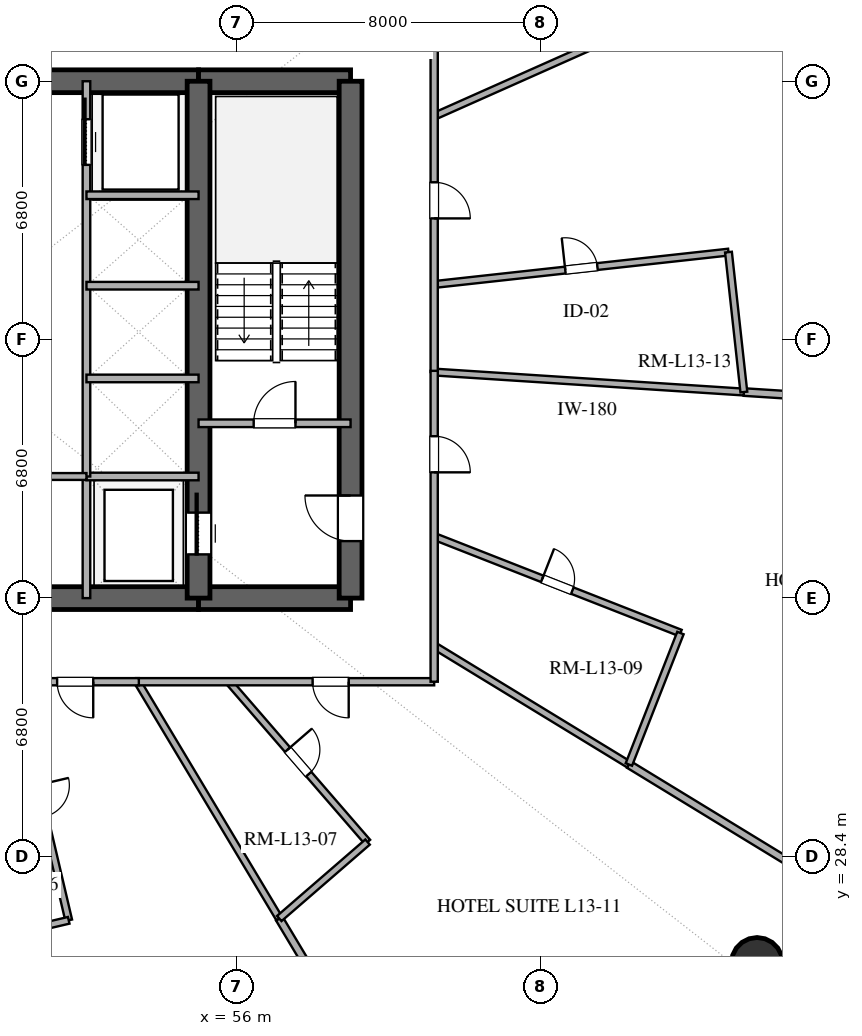
"""IFC4 building model, lengths in metres.
Left out: names, types, materials, properties, quantities, classifications, styles, units other than length and angle.
Written with IfcOpenShell. Run it as: python <this file> out.ifc"""

import sys

from ifc_helpers import new_model, si_unit, direction, frame, frame_2d, origin, origin_2d, place, context, subcontext, project, spatial, rectangle, hollow_circle, extrude, element, fill, save


model = new_model("IFC4")
c1 = context("Model", 3, precision=1e-05, world=origin(), true_north=direction((0.0, 1.0)))
c2 = subcontext(c1, "Body", "Model", "MODEL_VIEW")
j1 = project(units=[si_unit("LENGTHUNIT", "METRE"), si_unit("PLANEANGLEUNIT", "RADIAN")], contexts=[c1])
p1 = place(None, origin())
s1 = spatial("IfcSite", under=j1, at=p1, CompositionType="ELEMENT")
p2 = place(p1, origin())
s2 = spatial("IfcBuilding", under=s1, at=p2, CompositionType="ELEMENT")
p3 = place(p2, frame((0.0, 0.0, 57.0)))
s3 = spatial("IfcBuildingStorey", under=s2, at=p3, CompositionType="ELEMENT", Elevation=57.0)
p4 = place(p3, frame((41.0, 35.2, 0.0), z_axis=(0.0, 0.0, 1.0), x_axis=(1.0, 0.0, 0.0)))
e1 = element("IfcWall", 1, at=p4, inside=s3, PredefinedType="SHEAR", context=c2, shape_type="SweptSolid", body=[
    extrude(rectangle(XDim=14.0, YDim=0.6, at=frame_2d((7.0, 0.0))), origin(), (0.0, 0.0, 1.0), 3.38),
])
p5 = place(p4, frame((6.1, 0.0, 0.0)))
e2 = element("IfcOpeningElement", 2, at=p5, cuts=e1, PredefinedType="OPENING", context=c2, shape_type="SweptSolid", body=[
    extrude(rectangle(XDim=1.8, YDim=2.25, at=frame_2d((0.9, 1.125))), frame((0.0, 0.31, 0.0), z_axis=(0.0, -1.0, 0.0), x_axis=(1.0, 0.0, 0.0)), (0.0, 0.0, 1.0), 0.62),
])
p6 = place(p3, frame((55.0, 35.2, 0.0), z_axis=(0.0, 0.0, 1.0), x_axis=(1.0, 0.0, 0.0)))
e3 = element("IfcWall", 3, at=p6, inside=s3, PredefinedType="SHEAR", context=c2, shape_type="SweptSolid", body=[
    extrude(rectangle(XDim=4.0, YDim=0.6, at=frame_2d((2.0, 0.0))), origin(), (0.0, 0.0, 1.0), 3.38),
])
p7 = place(p3, frame((41.0, 48.8, 0.0), z_axis=(0.0, 0.0, 1.0), x_axis=(1.0, 0.0, 0.0)))
e4 = element("IfcWall", 4, at=p7, inside=s3, PredefinedType="SHEAR", context=c2, shape_type="SweptSolid", body=[
    extrude(rectangle(XDim=14.0, YDim=0.6, at=frame_2d((7.0, 0.0))), origin(), (0.0, 0.0, 1.0), 3.38),
])
p8 = place(p7, frame((6.1, 0.0, 0.0)))
e5 = element("IfcOpeningElement", 5, at=p8, cuts=e4, PredefinedType="OPENING", context=c2, shape_type="SweptSolid", body=[
    extrude(rectangle(XDim=1.8, YDim=2.25, at=frame_2d((0.9, 1.125))), frame((0.0, 0.31, 0.0), z_axis=(0.0, -1.0, 0.0), x_axis=(1.0, 0.0, 0.0)), (0.0, 0.0, 1.0), 0.62),
])
p9 = place(p3, frame((55.0, 48.8, 0.0), z_axis=(0.0, 0.0, 1.0), x_axis=(1.0, 0.0, 0.0)))
e6 = element("IfcWall", 6, at=p9, inside=s3, PredefinedType="SHEAR", context=c2, shape_type="SweptSolid", body=[
    extrude(rectangle(XDim=4.0, YDim=0.6, at=frame_2d((2.0, 0.0))), origin(), (0.0, 0.0, 1.0), 3.38),
])
p10 = place(p3, frame((59.0, 35.2, 0.0), z_axis=(0.0, 0.0, 1.0), x_axis=(0.0, 1.0, 0.0)))
e7 = element("IfcWall", 7, at=p10, inside=s3, PredefinedType="SHEAR", context=c2, shape_type="SweptSolid", body=[
    extrude(rectangle(XDim=13.6, YDim=0.6, at=frame_2d((6.8, 0.0))), origin(), (0.0, 0.0, 1.0), 3.38),
])
p11 = place(p10, frame((1.5, 0.0, 0.0)))
e8 = element("IfcOpeningElement", 8, at=p11, cuts=e7, PredefinedType="OPENING", context=c2, shape_type="SweptSolid", body=[
    extrude(rectangle(XDim=1.2, YDim=2.15, at=frame_2d((0.6, 1.075))), frame((0.0, 0.31, 0.0), z_axis=(0.0, -1.0, 0.0), x_axis=(1.0, 0.0, 0.0)), (0.0, 0.0, 1.0), 0.62),
])
p12 = place(p3, frame((55.0, 35.2, 0.0), z_axis=(0.0, 0.0, 1.0), x_axis=(0.0, 1.0, 0.0)))
e9 = element("IfcWall", 9, at=p12, inside=s3, PredefinedType="SHEAR", context=c2, shape_type="SweptSolid", body=[
    extrude(rectangle(XDim=13.6, YDim=0.6, at=frame_2d((6.8, 0.0))), origin(), (0.0, 0.0, 1.0), 3.38),
])
p13 = place(p12, frame((1.15, 0.0, 0.0)))
e10 = element("IfcOpeningElement", 10, at=p13, cuts=e9, PredefinedType="OPENING", context=c2, shape_type="SweptSolid", body=[
    extrude(rectangle(XDim=1.1, YDim=2.2, at=frame_2d((0.55, 1.1))), frame((0.0, 0.31, 0.0), z_axis=(0.0, -1.0, 0.0), x_axis=(1.0, 0.0, 0.0)), (0.0, 0.0, 1.0), 0.62),
])
p14 = place(p3, frame((69.697, 25.595, 0.0), z_axis=(0.0, 0.0, 1.0), x_axis=(1.0, 0.0, 0.0)))
e11 = element("IfcColumn", 11, at=p14, inside=s3, PredefinedType="COLUMN", context=c2, shape_type="SweptSolid", body=[
    extrude(hollow_circle(Radius=0.675, WallThickness=0.036, at=origin_2d()), origin(), (0.0, 0.0, 1.0), 3.38),
])
p15 = place(p3, frame((70.174, 25.114, 0.0), z_axis=(0.0, 0.0, 1.0), x_axis=(0.637296809613, 0.770618437657, 0.0)))
e12 = element("IfcWall", 12, at=p15, inside=s3, PredefinedType="SOLIDWALL", context=c2, shape_type="SweptSolid", body=[
    extrude(rectangle(XDim=10.053, YDim=0.28, at=frame_2d((5.027, 0.0))), origin(), (0.0, 0.0, 1.0), 3.38),
])
p16 = place(p15, frame((1.565, 0.0, 0.85)))
e13 = element("IfcOpeningElement", 13, at=p16, cuts=e12, PredefinedType="OPENING", context=c2, shape_type="SweptSolid", body=[
    extrude(rectangle(XDim=1.0, YDim=1.8, at=frame_2d((0.5, 0.9))), frame((0.0, 0.15, 0.0), z_axis=(0.0, -1.0, 0.0), x_axis=(1.0, 0.0, 0.0)), (0.0, 0.0, 1.0), 0.3),
])
p17 = place(p15, frame((4.03, 0.0, 0.85)))
e14 = element("IfcOpeningElement", 14, at=p17, cuts=e12, PredefinedType="OPENING", context=c2, shape_type="SweptSolid", body=[
    extrude(rectangle(XDim=1.35, YDim=1.8, at=frame_2d((0.675, 0.9))), frame((0.0, 0.15, 0.0), z_axis=(0.0, -1.0, 0.0), x_axis=(1.0, 0.0, 0.0)), (0.0, 0.0, 1.0), 0.3),
])
p18 = place(p15, frame((6.246, 0.0, 0.85)))
e15 = element("IfcOpeningElement", 15, at=p18, cuts=e12, PredefinedType="OPENING", context=c2, shape_type="SweptSolid", body=[
    extrude(rectangle(XDim=1.35, YDim=1.8, at=frame_2d((0.675, 0.9))), frame((0.0, 0.15, 0.0), z_axis=(0.0, -1.0, 0.0), x_axis=(1.0, 0.0, 0.0)), (0.0, 0.0, 1.0), 0.3),
])
p19 = place(p3, frame((55.0, 39.8, 0.0), z_axis=(0.0, 0.0, 1.0), x_axis=(1.0, 0.0, 0.0)))
e16 = element("IfcWall", 16, at=p19, inside=s3, PredefinedType="SOLIDWALL", context=c2, shape_type="SweptSolid", body=[
    extrude(rectangle(XDim=4.0, YDim=0.2, at=frame_2d((2.0, 0.0))), origin(), (0.0, 0.0, 1.0), 2.74),
])
p20 = place(p19, frame((1.45, 0.0, 0.0)))
e17 = element("IfcOpeningElement", 17, at=p20, cuts=e16, PredefinedType="OPENING", context=c2, shape_type="SweptSolid", body=[
    extrude(rectangle(XDim=1.1, YDim=2.15, at=frame_2d((0.55, 1.075))), frame((0.0, 0.11, 0.0), z_axis=(0.0, -1.0, 0.0), x_axis=(1.0, 0.0, 0.0)), (0.0, 0.0, 1.0), 0.22),
])
p21 = place(p3, frame((52.05, 35.2, 0.0), z_axis=(0.0, 0.0, 1.0), x_axis=(0.0, 1.0, 0.0)))
e18 = element("IfcWall", 18, at=p21, inside=s3, PredefinedType="SOLIDWALL", context=c2, shape_type="SweptSolid", body=[
    extrude(rectangle(XDim=3.2, YDim=0.2, at=frame_2d((1.6, 0.0))), origin(), (0.0, 0.0, 1.0), 2.74),
])
p22 = place(p3, frame((52.05, 38.4, 0.0), z_axis=(0.0, 0.0, 1.0), x_axis=(1.0, 0.0, 0.0)))
e19 = element("IfcWall", 19, at=p22, inside=s3, PredefinedType="SOLIDWALL", context=c2, shape_type="SweptSolid", body=[
    extrude(rectangle(XDim=2.95, YDim=0.2, at=frame_2d((1.475, 0.0))), origin(), (0.0, 0.0, 1.0), 2.74),
])
p23 = place(p3, frame((52.05, 38.4, 0.0), z_axis=(0.0, 0.0, 1.0), x_axis=(0.0, 1.0, 0.0)))
e20 = element("IfcWall", 20, at=p23, inside=s3, PredefinedType="SOLIDWALL", context=c2, shape_type="SweptSolid", body=[
    extrude(rectangle(XDim=10.4, YDim=0.2, at=frame_2d((5.2, 0.0))), origin(), (0.0, 0.0, 1.0), 2.74),
])
p24 = place(p23, frame((8.2, 0.0, 0.0)))
e21 = element("IfcOpeningElement", 21, at=p24, cuts=e20, PredefinedType="OPENING", context=c2, shape_type="SweptSolid", body=[
    extrude(rectangle(XDim=1.2, YDim=2.2, at=frame_2d((0.6, 1.1))), frame((0.0, 0.11, 0.0), z_axis=(0.0, -1.0, 0.0), x_axis=(1.0, 0.0, 0.0)), (0.0, 0.0, 1.0), 0.22),
])
for number, where, z_axis, x_axis in (
    (22, (52.05, 40.98, 0.0), (0.0, 0.0, 1.0), (1.0, 0.0, 0.0)),
    (23, (52.05, 43.42, 0.0), (0.0, 0.0, 1.0), (1.0, 0.0, 0.0)),
    (24, (52.05, 45.8, 0.0), (0.0, 0.0, 1.0), (1.0, 0.0, 0.0)),
):
    element("IfcWall", number, at=place(p3, frame(where, z_axis=z_axis, x_axis=x_axis)), inside=s3, PredefinedType="SOLIDWALL", context=c2, shape_type="SweptSolid", body=[
        extrude(rectangle(XDim=2.95, YDim=0.2, at=frame_2d((1.475, 0.0))), origin(), (0.0, 0.0, 1.0), 2.74),
    ])
p25 = place(p3, frame((49.2, 38.4, 0.0), z_axis=(0.0, 0.0, 1.0), x_axis=(1.0, 0.0, 0.0)))
e25 = element("IfcWall", 25, at=p25, inside=s3, PredefinedType="PLUMBINGWALL", context=c2, shape_type="SweptSolid", body=[
    extrude(rectangle(XDim=2.85, YDim=0.18, at=frame_2d((1.425, 0.0))), origin(), (0.0, 0.0, 1.0), 2.74),
])
p26 = place(p3, frame((78.364, 40.041, 0.0), z_axis=(0.0, 0.0, 1.0), x_axis=(-0.997924020497, 0.064402246198, 0.0)))
e26 = element("IfcWall", 26, at=p26, inside=s3, PredefinedType="PARTITIONING", context=c2, shape_type="SweptSolid", body=[
    extrude(rectangle(XDim=9.034, YDim=0.2, at=frame_2d((4.517, 0.0))), origin(), (0.0, 0.0, 1.0), 2.74),
])
p27 = place(p3, frame((69.349, 40.622, 0.0), z_axis=(0.0, 0.0, 1.0), x_axis=(-0.997924317455, 0.064397644621, 0.0)))
e27 = element("IfcWall", 27, at=p27, inside=s3, PredefinedType="PLUMBINGWALL", context=c2, shape_type="SweptSolid", body=[
    extrude(rectangle(XDim=8.166, YDim=0.18, at=frame_2d((4.083, 0.0))), origin(), (0.0, 0.0, 1.0), 2.74),
])
p28 = place(p3, frame((61.2, 43.452, 0.0), z_axis=(0.0, 0.0, 1.0), x_axis=(0.994005037085, 0.109334286708, 0.0)))
e28 = element("IfcWall", 28, at=p28, inside=s3, PredefinedType="PLUMBINGWALL", context=c2, shape_type="SweptSolid", body=[
    extrude(rectangle(XDim=7.791, YDim=0.18, at=frame_2d((3.896, 0.0))), origin(), (0.0, 0.0, 1.0), 2.74),
])
p29 = place(p28, frame((3.47, 0.0, 0.0)))
e29 = element("IfcOpeningElement", 29, at=p29, cuts=e28, PredefinedType="OPENING", context=c2, shape_type="SweptSolid", body=[
    extrude(rectangle(XDim=0.85, YDim=2.1, at=frame_2d((0.425, 1.05))), frame((0.0, 0.1, 0.0), z_axis=(0.0, -1.0, 0.0), x_axis=(1.0, 0.0, 0.0)), (0.0, 0.0, 1.0), 0.2),
])
p30 = place(p3, frame((61.01, 20.281, 0.0), z_axis=(0.0, 0.0, 1.0), x_axis=(-0.513892719639, 0.857854458928, 0.0)))
e30 = element("IfcWall", 30, at=p30, inside=s3, PredefinedType="PARTITIONING", context=c2, shape_type="SweptSolid", body=[
    extrude(rectangle(XDim=7.563, YDim=0.2, at=frame_2d((3.781, 0.0))), origin(), (0.0, 0.0, 1.0), 2.74),
])
p31 = place(p3, frame((57.124, 26.769, 0.0), z_axis=(0.0, 0.0, 1.0), x_axis=(-0.513872793929, 0.857866394994, 0.0)))
e31 = element("IfcWall", 31, at=p31, inside=s3, PredefinedType="PLUMBINGWALL", context=c2, shape_type="SweptSolid", body=[
    extrude(rectangle(XDim=7.263, YDim=0.18, at=frame_2d((3.632, 0.0))), origin(), (0.0, 0.0, 1.0), 2.74),
])
p32 = place(p3, frame((61.2, 36.823, 0.0), z_axis=(0.0, 0.0, 1.0), x_axis=(0.930954264603, -0.365135806539, 0.0)))
e32 = element("IfcWall", 32, at=p32, inside=s3, PredefinedType="PLUMBINGWALL", context=c2, shape_type="SweptSolid", body=[
    extrude(rectangle(XDim=6.961, YDim=0.18, at=frame_2d((3.48, 0.0))), origin(), (0.0, 0.0, 1.0), 2.74),
])
p33 = place(p32, frame((3.055, 0.0, 0.0)))
e33 = element("IfcOpeningElement", 33, at=p33, cuts=e32, PredefinedType="OPENING", context=c2, shape_type="SweptSolid", body=[
    extrude(rectangle(XDim=0.85, YDim=2.1, at=frame_2d((0.425, 1.05))), frame((0.0, 0.1, 0.0), z_axis=(0.0, -1.0, 0.0), x_axis=(1.0, 0.0, 0.0)), (0.0, 0.0, 1.0), 0.2),
])
p34 = place(p3, frame((72.123, 27.284, 0.0), z_axis=(0.0, 0.0, 1.0), x_axis=(-0.853686673388, 0.520786965735, 0.0)))
e34 = element("IfcWall", 34, at=p34, inside=s3, PredefinedType="PARTITIONING", context=c2, shape_type="SweptSolid", body=[
    extrude(rectangle(XDim=6.793, YDim=0.2, at=frame_2d((3.396, 0.0))), origin(), (0.0, 0.0, 1.0), 2.74),
])
p35 = place(p3, frame((67.278, 50.583, 0.0), z_axis=(0.0, 0.0, 1.0), x_axis=(-0.913551093465, -0.406723984575, 0.0)))
e35 = element("IfcWall", 35, at=p35, inside=s3, PredefinedType="PLUMBINGWALL", context=c2, shape_type="SweptSolid", body=[
    extrude(rectangle(XDim=6.653, YDim=0.18, at=frame_2d((3.327, 0.0))), origin(), (0.0, 0.0, 1.0), 2.74),
])
p36 = place(p3, frame((50.111, 33.0, 0.0), z_axis=(0.0, 0.0, 1.0), x_axis=(0.228380862789, -0.973571867666, 0.0)))
e36 = element("IfcWall", 36, at=p36, inside=s3, PredefinedType="PLUMBINGWALL", context=c2, shape_type="SweptSolid", body=[
    extrude(rectangle(XDim=6.448, YDim=0.18, at=frame_2d((3.224, 0.0))), origin(), (0.0, 0.0, 1.0), 2.74),
])
p37 = place(p36, frame((2.799, 0.0, 0.0)))
e37 = element("IfcOpeningElement", 37, at=p37, cuts=e36, PredefinedType="OPENING", context=c2, shape_type="SweptSolid", body=[
    extrude(rectangle(XDim=0.85, YDim=2.1, at=frame_2d((0.425, 1.05))), frame((0.0, 0.1, 0.0), z_axis=(0.0, -1.0, 0.0), x_axis=(1.0, 0.0, 0.0)), (0.0, 0.0, 1.0), 0.2),
])
p38 = place(p3, frame((66.323, 30.822, 0.0), z_axis=(0.0, 0.0, 1.0), x_axis=(-0.853693843866, 0.52077521153, 0.0)))
e38 = element("IfcWall", 38, at=p38, inside=s3, PredefinedType="PLUMBINGWALL", context=c2, shape_type="SweptSolid", body=[
    extrude(rectangle(XDim=6.002, YDim=0.18, at=frame_2d((3.001, 0.0))), origin(), (0.0, 0.0, 1.0), 2.74),
])
p39 = place(p3, frame((55.794, 33.0, 0.0), z_axis=(0.0, 0.0, 1.0), x_axis=(0.654630697525, -0.755948840767, 0.0)))
e39 = element("IfcWall", 39, at=p39, inside=s3, PredefinedType="PLUMBINGWALL", context=c2, shape_type="SweptSolid", body=[
    extrude(rectangle(XDim=5.581, YDim=0.18, at=frame_2d((2.791, 0.0))), origin(), (0.0, 0.0, 1.0), 2.74),
])
p40 = place(p39, frame((2.365, 0.0, 0.0)))
e40 = element("IfcOpeningElement", 40, at=p40, cuts=e39, PredefinedType="OPENING", context=c2, shape_type="SweptSolid", body=[
    extrude(rectangle(XDim=0.85, YDim=2.1, at=frame_2d((0.425, 1.05))), frame((0.0, 0.1, 0.0), z_axis=(0.0, -1.0, 0.0), x_axis=(1.0, 0.0, 0.0)), (0.0, 0.0, 1.0), 0.2),
])
p41 = place(p3, frame((61.2, 33.0, 0.0), z_axis=(0.0, 0.0, 1.0), x_axis=(-1.0, 0.0, 0.0)))
e41 = element("IfcWall", 41, at=p41, inside=s3, PredefinedType="PARTITIONING", context=c2, shape_type="SweptSolid", body=[
    extrude(rectangle(XDim=7.846, YDim=0.19, at=frame_2d((3.923, 0.0))), origin(), (0.0, 0.0, 1.0), 2.74),
])
p42 = place(p41, frame((2.249, 0.0, 0.0)))
e42 = element("IfcOpeningElement", 42, at=p42, cuts=e41, PredefinedType="OPENING", context=c2, shape_type="SweptSolid", body=[
    extrude(rectangle(XDim=0.95, YDim=2.15, at=frame_2d((0.475, 1.075))), frame((0.0, 0.105, 0.0), z_axis=(0.0, -1.0, 0.0), x_axis=(1.0, 0.0, 0.0)), (0.0, 0.0, 1.0), 0.21),
])
p43 = place(p3, frame((61.2, 51.0, 0.0), z_axis=(0.0, 0.0, 1.0), x_axis=(0.0, -1.0, 0.0)))
e43 = element("IfcWall", 43, at=p43, inside=s3, PredefinedType="PARTITIONING", context=c2, shape_type="SweptSolid", body=[
    extrude(rectangle(XDim=9.852, YDim=0.19, at=frame_2d((4.926, 0.0))), origin(), (0.0, 0.0, 1.0), 2.74),
])
p44 = place(p43, frame((4.859, 0.0, 0.0)))
e44 = element("IfcOpeningElement", 44, at=p44, cuts=e43, PredefinedType="OPENING", context=c2, shape_type="SweptSolid", body=[
    extrude(rectangle(XDim=0.95, YDim=2.15, at=frame_2d((0.475, 1.075))), frame((0.0, 0.105, 0.0), z_axis=(0.0, -1.0, 0.0), x_axis=(1.0, 0.0, 0.0)), (0.0, 0.0, 1.0), 0.21),
])
p45 = place(p3, frame((61.2, 41.18, 0.0), z_axis=(0.0, 0.0, 1.0), x_axis=(0.0, -1.0, 0.0)))
e45 = element("IfcWall", 45, at=p45, inside=s3, PredefinedType="PARTITIONING", context=c2, shape_type="SweptSolid", body=[
    extrude(rectangle(XDim=8.18, YDim=0.19, at=frame_2d((4.09, 0.0))), origin(), (0.0, 0.0, 1.0), 2.74),
])
p46 = place(p45, frame((1.721, 0.0, 0.0)))
e46 = element("IfcOpeningElement", 46, at=p46, cuts=e45, PredefinedType="OPENING", context=c2, shape_type="SweptSolid", body=[
    extrude(rectangle(XDim=0.95, YDim=2.15, at=frame_2d((0.475, 1.075))), frame((0.0, 0.105, 0.0), z_axis=(0.0, -1.0, 0.0), x_axis=(1.0, 0.0, 0.0)), (0.0, 0.0, 1.0), 0.21),
])
p47 = place(p3, frame((67.68, 34.281, 0.0), z_axis=(0.0, 0.0, 1.0), x_axis=(-0.365174619735, -0.930939040486, 0.0)))
e47 = element("IfcWall", 47, at=p47, inside=s3, PredefinedType="PLUMBINGWALL", context=c2, shape_type="SweptSolid", body=[
    extrude(rectangle(XDim=3.716, YDim=0.18, at=frame_2d((1.858, 0.0))), origin(), (0.0, 0.0, 1.0), 2.74),
])
p48 = place(p3, frame((68.944, 44.304, 0.0), z_axis=(0.0, 0.0, 1.0), x_axis=(0.109360669908, -0.994002134745, 0.0)))
e48 = element("IfcWall", 48, at=p48, inside=s3, PredefinedType="PLUMBINGWALL", context=c2, shape_type="SweptSolid", body=[
    extrude(rectangle(XDim=3.704, YDim=0.18, at=frame_2d((1.852, 0.0))), origin(), (0.0, 0.0, 1.0), 2.74),
])
p49 = place(p3, frame((53.429, 33.0, 0.0), z_axis=(0.0, 0.0, 1.0), x_axis=(-1.0, 0.0, 0.0)))
e49 = element("IfcWall", 49, at=p49, inside=s3, PredefinedType="PARTITIONING", context=c2, shape_type="SweptSolid", body=[
    extrude(rectangle(XDim=3.351, YDim=0.19, at=frame_2d((1.675, 0.0))), origin(), (0.0, 0.0, 1.0), 2.74),
])
p50 = place(p49, frame((1.2, 0.0, 0.0)))
e50 = element("IfcOpeningElement", 50, at=p50, cuts=e49, PredefinedType="OPENING", context=c2, shape_type="SweptSolid", body=[
    extrude(rectangle(XDim=0.95, YDim=2.15, at=frame_2d((0.475, 1.075))), frame((0.0, 0.105, 0.0), z_axis=(0.0, -1.0, 0.0), x_axis=(1.0, 0.0, 0.0)), (0.0, 0.0, 1.0), 0.21),
])
p51 = place(p3, frame((59.447, 28.781, 0.0), z_axis=(0.0, 0.0, 1.0), x_axis=(-0.755927521829, -0.654655315217, 0.0)))
e51 = element("IfcWall", 51, at=p51, inside=s3, PredefinedType="PLUMBINGWALL", context=c2, shape_type="SweptSolid", body=[
    extrude(rectangle(XDim=3.074, YDim=0.18, at=frame_2d((1.537, 0.0))), origin(), (0.0, 0.0, 1.0), 2.74),
])
p52 = place(p3, frame((51.583, 26.722, 0.0), z_axis=(0.0, 0.0, 1.0), x_axis=(-0.973579428385, -0.228348629567, 0.0)))
e52 = element("IfcWall", 52, at=p52, inside=s3, PredefinedType="PLUMBINGWALL", context=c2, shape_type="SweptSolid", body=[
    extrude(rectangle(XDim=2.759, YDim=0.18, at=frame_2d((1.379, 0.0))), origin(), (0.0, 0.0, 1.0), 2.74),
])
p53 = place(p13, origin())
e53 = element("IfcDoor", 53, at=p53, inside=s3, OperationType="SLIDING_TO_RIGHT", PredefinedType="DOOR", context=c2, shape_type="SweptSolid", body=[
    extrude(rectangle(XDim=1.1, YDim=2.2, at=frame_2d((0.55, 1.1))), frame((0.0, 0.025, 0.0), z_axis=(0.0, -1.0, 0.0), x_axis=(1.0, 0.0, 0.0)), (0.0, 0.0, 1.0), 0.05),
])
fill(e10, e53)
p54 = place(p11, origin())
e54 = element("IfcDoor", 54, at=p54, inside=s3, OperationType="SINGLE_SWING_RIGHT", PredefinedType="DOOR", context=c2, shape_type="SweptSolid", body=[
    extrude(rectangle(XDim=1.2, YDim=2.15, at=frame_2d((0.6, 1.075))), frame((0.0, 0.025, 0.0), z_axis=(0.0, -1.0, 0.0), x_axis=(1.0, 0.0, 0.0)), (0.0, 0.0, 1.0), 0.05),
])
fill(e8, e54)
p55 = place(p20, origin())
e55 = element("IfcDoor", 55, at=p55, inside=s3, OperationType="SINGLE_SWING_RIGHT", PredefinedType="DOOR", context=c2, shape_type="SweptSolid", body=[
    extrude(rectangle(XDim=1.1, YDim=2.15, at=frame_2d((0.55, 1.075))), frame((0.0, 0.025, 0.0), z_axis=(0.0, -1.0, 0.0), x_axis=(1.0, 0.0, 0.0)), (0.0, 0.0, 1.0), 0.05),
])
fill(e17, e55)
p56 = place(p24, origin())
e56 = element("IfcDoor", 56, at=p56, inside=s3, OperationType="SLIDING_TO_RIGHT", PredefinedType="DOOR", context=c2, shape_type="SweptSolid", body=[
    extrude(rectangle(XDim=1.2, YDim=2.2, at=frame_2d((0.6, 1.1))), frame((0.0, 0.025, 0.0), z_axis=(0.0, -1.0, 0.0), x_axis=(1.0, 0.0, 0.0)), (0.0, 0.0, 1.0), 0.05),
])
fill(e21, e56)
p57 = place(p29, origin())
e57 = element("IfcDoor", 57, at=p57, inside=s3, OperationType="SINGLE_SWING_LEFT", PredefinedType="DOOR", context=c2, shape_type="SweptSolid", body=[
    extrude(rectangle(XDim=0.85, YDim=2.1, at=frame_2d((0.425, 1.05))), frame((0.0, 0.025, 0.0), z_axis=(0.0, -1.0, 0.0), x_axis=(1.0, 0.0, 0.0)), (0.0, 0.0, 1.0), 0.05),
])
fill(e29, e57)
p58 = place(p33, origin())
e58 = element("IfcDoor", 58, at=p58, inside=s3, OperationType="SINGLE_SWING_LEFT", PredefinedType="DOOR", context=c2, shape_type="SweptSolid", body=[
    extrude(rectangle(XDim=0.85, YDim=2.1, at=frame_2d((0.425, 1.05))), frame((0.0, 0.025, 0.0), z_axis=(0.0, -1.0, 0.0), x_axis=(1.0, 0.0, 0.0)), (0.0, 0.0, 1.0), 0.05),
])
fill(e33, e58)
p59 = place(p40, origin())
e59 = element("IfcDoor", 59, at=p59, inside=s3, OperationType="SINGLE_SWING_LEFT", PredefinedType="DOOR", context=c2, shape_type="SweptSolid", body=[
    extrude(rectangle(XDim=0.85, YDim=2.1, at=frame_2d((0.425, 1.05))), frame((0.0, 0.025, 0.0), z_axis=(0.0, -1.0, 0.0), x_axis=(1.0, 0.0, 0.0)), (0.0, 0.0, 1.0), 0.05),
])
fill(e40, e59)
p60 = place(p42, origin())
e60 = element("IfcDoor", 60, at=p60, inside=s3, OperationType="SINGLE_SWING_LEFT", PredefinedType="DOOR", context=c2, shape_type="SweptSolid", body=[
    extrude(rectangle(XDim=0.95, YDim=2.15, at=frame_2d((0.475, 1.075))), frame((0.0, 0.025, 0.0), z_axis=(0.0, -1.0, 0.0), x_axis=(1.0, 0.0, 0.0)), (0.0, 0.0, 1.0), 0.05),
])
fill(e42, e60)
p61 = place(p44, origin())
e61 = element("IfcDoor", 61, at=p61, inside=s3, OperationType="SINGLE_SWING_RIGHT", PredefinedType="DOOR", context=c2, shape_type="SweptSolid", body=[
    extrude(rectangle(XDim=0.95, YDim=2.15, at=frame_2d((0.475, 1.075))), frame((0.0, 0.025, 0.0), z_axis=(0.0, -1.0, 0.0), x_axis=(1.0, 0.0, 0.0)), (0.0, 0.0, 1.0), 0.05),
])
fill(e44, e61)
p62 = place(p46, origin())
e62 = element("IfcDoor", 62, at=p62, inside=s3, OperationType="SINGLE_SWING_RIGHT", PredefinedType="DOOR", context=c2, shape_type="SweptSolid", body=[
    extrude(rectangle(XDim=0.95, YDim=2.15, at=frame_2d((0.475, 1.075))), frame((0.0, 0.025, 0.0), z_axis=(0.0, -1.0, 0.0), x_axis=(1.0, 0.0, 0.0)), (0.0, 0.0, 1.0), 0.05),
])
fill(e46, e62)
p63 = place(p50, origin())
e63 = element("IfcDoor", 63, at=p63, inside=s3, OperationType="SINGLE_SWING_LEFT", PredefinedType="DOOR", context=c2, shape_type="SweptSolid", body=[
    extrude(rectangle(XDim=0.95, YDim=2.15, at=frame_2d((0.475, 1.075))), frame((0.0, 0.025, 0.0), z_axis=(0.0, -1.0, 0.0), x_axis=(1.0, 0.0, 0.0)), (0.0, 0.0, 1.0), 0.05),
])
fill(e50, e63)
save(model, sys.argv[1])
